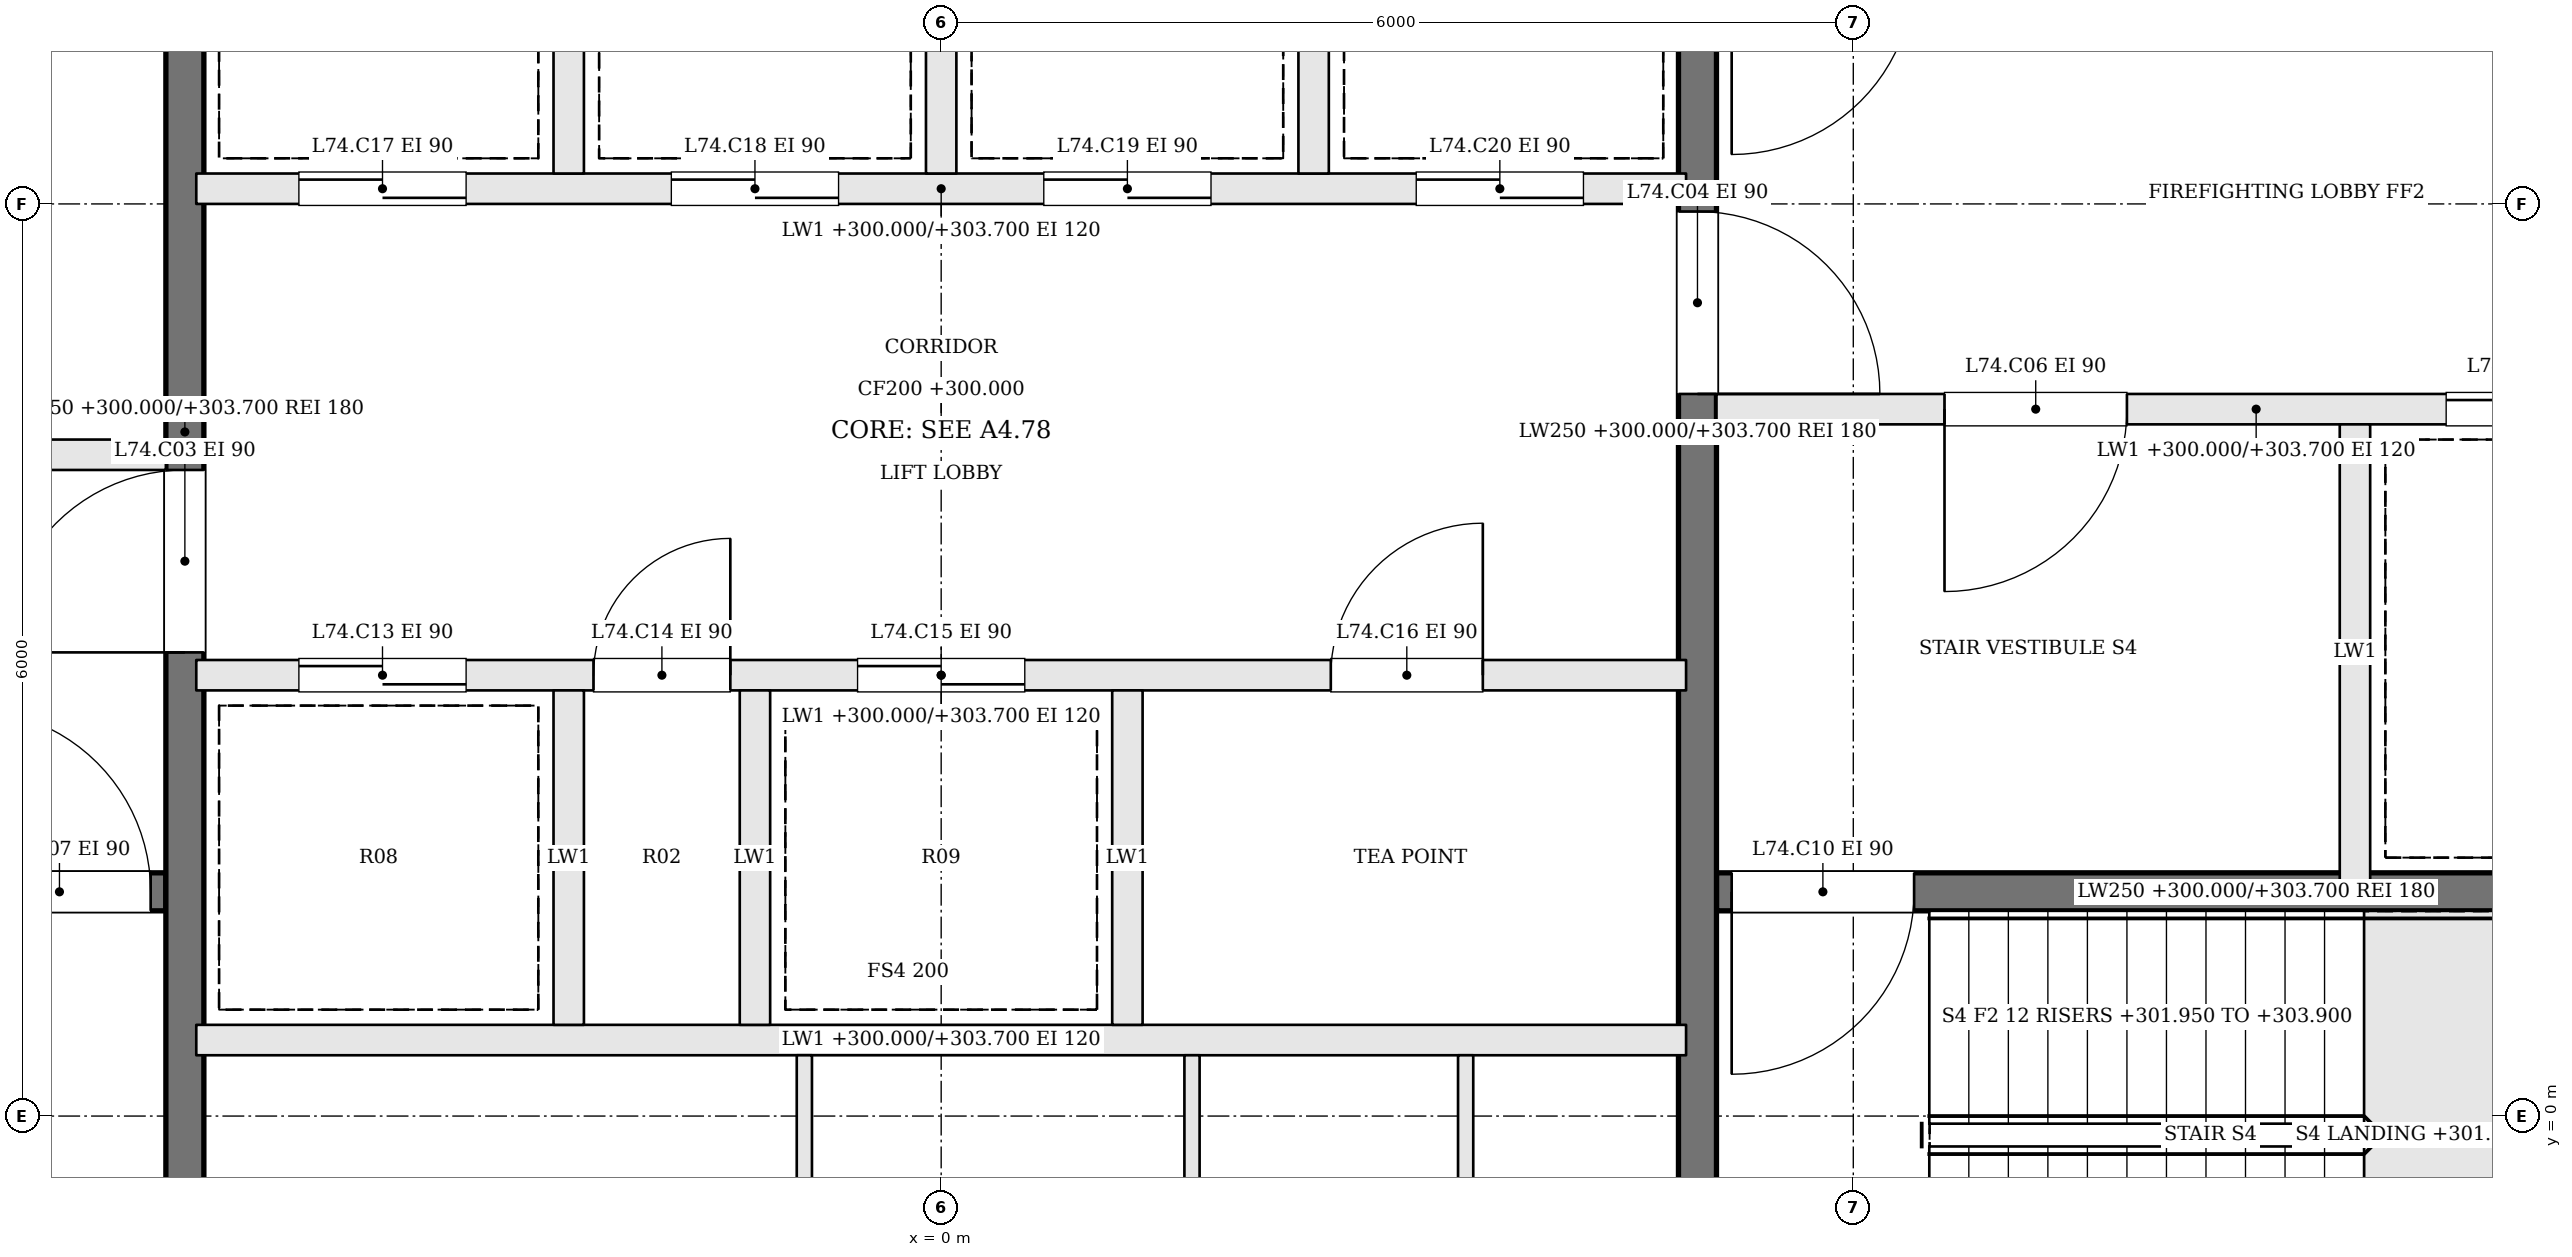
"""IFC4 building model, lengths in metres.
Left out: names, types, materials, properties, quantities, classifications, styles, units other than length and angle.
Written with IfcOpenShell. Run it as: python <this file> out.ifc"""

import sys

from ifc_helpers import new_model, si_unit, direction, frame, frame_2d, origin, place, context, subcontext, project, spatial, rectangle, extrude, element, fill, save


model = new_model("IFC4")
c1 = context("Model", 3, precision=1e-05, world=origin(), true_north=direction((0.0, 1.0)))
c2 = subcontext(c1, "Body", "Model", "MODEL_VIEW")
j1 = project(units=[si_unit("LENGTHUNIT", "METRE"), si_unit("PLANEANGLEUNIT", "RADIAN")], contexts=[c1])
p1 = place(None, origin())
s1 = spatial("IfcSite", under=j1, at=p1, CompositionType="ELEMENT")
p2 = place(p1, origin())
s2 = spatial("IfcBuilding", under=s1, at=p2, CompositionType="ELEMENT")
p3 = place(p2, frame((0.0, 0.0, 300.0)))
s3 = spatial("IfcBuildingStorey", under=s2, at=p3, CompositionType="ELEMENT", Elevation=300.0)
p4 = place(p3, frame((-12.2, 1.475, 0.0), z_axis=(0.0, 0.0, 1.0), x_axis=(1.0, 0.0, 0.0)))
e1 = element("IfcWall", 1, at=p4, inside=s3, PredefinedType="SOLIDWALL", context=c2, shape_type="SweptSolid", body=[
    extrude(rectangle(XDim=7.1, YDim=0.25, at=frame_2d((3.55, 0.0))), origin(), (0.0, 0.0, 1.0), 3.7),
])
p5 = place(p4, frame((5.8, 0.0, 0.0)))
e2 = element("IfcOpeningElement", 2, at=p5, cuts=e1, PredefinedType="OPENING", context=c2, shape_type="SweptSolid", body=[
    extrude(rectangle(XDim=1.2, YDim=2.1, at=frame_2d((0.6, 1.05))), frame((0.0, 0.135, 0.0), z_axis=(0.0, -1.0, 0.0), x_axis=(1.0, 0.0, 0.0)), (0.0, 0.0, 1.0), 0.27),
])
p6 = place(p3, frame((-12.2, 4.35, 0.0), z_axis=(0.0, 0.0, 1.0), x_axis=(1.0, 0.0, 0.0)))
e3 = element("IfcWall", 3, at=p6, inside=s3, PredefinedType="SOLIDWALL", context=c2, shape_type="SweptSolid", body=[
    extrude(rectangle(XDim=7.1, YDim=0.2, at=frame_2d((3.55, 0.0))), origin(), (0.0, 0.0, 1.0), 3.7),
])
p7 = place(p6, frame((4.4, 0.0, 0.0)))
e4 = element("IfcOpeningElement", 4, at=p7, cuts=e3, PredefinedType="OPENING", context=c2, shape_type="SweptSolid", body=[
    extrude(rectangle(XDim=1.2, YDim=2.1, at=frame_2d((0.6, 1.05))), frame((0.0, 0.11, 0.0), z_axis=(0.0, -1.0, 0.0), x_axis=(1.0, 0.0, 0.0)), (0.0, 0.0, 1.0), 0.22),
])
p8 = place(p6, frame((1.1, 0.0, 0.0)))
e5 = element("IfcOpeningElement", 5, at=p8, cuts=e3, PredefinedType="OPENING", context=c2, shape_type="SweptSolid", body=[
    extrude(rectangle(XDim=1.2, YDim=2.1, at=frame_2d((0.6, 1.05))), frame((0.0, 0.11, 0.0), z_axis=(0.0, -1.0, 0.0), x_axis=(1.0, 0.0, 0.0)), (0.0, 0.0, 1.0), 0.22),
])
p9 = place(p3, frame((12.2, 4.65, 0.0), z_axis=(0.0, 0.0, 1.0), x_axis=(-1.0, 0.0, 0.0)))
e6 = element("IfcWall", 6, at=p9, inside=s3, PredefinedType="SOLIDWALL", context=c2, shape_type="SweptSolid", body=[
    extrude(rectangle(XDim=7.1, YDim=0.2, at=frame_2d((3.55, 0.0))), origin(), (0.0, 0.0, 1.0), 3.7),
])
p10 = place(p9, frame((4.4, 0.0, 0.0)))
e7 = element("IfcOpeningElement", 7, at=p10, cuts=e6, PredefinedType="OPENING", context=c2, shape_type="SweptSolid", body=[
    extrude(rectangle(XDim=1.2, YDim=2.1, at=frame_2d((0.6, 1.05))), frame((0.0, 0.11, 0.0), z_axis=(0.0, -1.0, 0.0), x_axis=(1.0, 0.0, 0.0)), (0.0, 0.0, 1.0), 0.22),
])
p11 = place(p9, frame((1.1, 0.0, 0.0)))
e8 = element("IfcOpeningElement", 8, at=p11, cuts=e6, PredefinedType="OPENING", context=c2, shape_type="SweptSolid", body=[
    extrude(rectangle(XDim=1.2, YDim=2.1, at=frame_2d((0.6, 1.05))), frame((0.0, 0.11, 0.0), z_axis=(0.0, -1.0, 0.0), x_axis=(1.0, 0.0, 0.0)), (0.0, 0.0, 1.0), 0.22),
])
p12 = place(p3, frame((12.2, 1.475, 0.0), z_axis=(0.0, 0.0, 1.0), x_axis=(-1.0, 0.0, 0.0)))
e9 = element("IfcWall", 9, at=p12, inside=s3, PredefinedType="SOLIDWALL", context=c2, shape_type="SweptSolid", body=[
    extrude(rectangle(XDim=7.1, YDim=0.25, at=frame_2d((3.55, 0.0))), origin(), (0.0, 0.0, 1.0), 3.7),
])
p13 = place(p12, frame((5.8, 0.0, 0.0)))
e10 = element("IfcOpeningElement", 10, at=p13, cuts=e9, PredefinedType="OPENING", context=c2, shape_type="SweptSolid", body=[
    extrude(rectangle(XDim=1.2, YDim=2.1, at=frame_2d((0.6, 1.05))), frame((0.0, 0.135, 0.0), z_axis=(0.0, -1.0, 0.0), x_axis=(1.0, 0.0, 0.0)), (0.0, 0.0, 1.0), 0.27),
])
p14 = place(p3, frame((9.3, 4.55, 0.0), z_axis=(0.0, 0.0, 1.0), x_axis=(0.0, -1.0, 0.0)))
e11 = element("IfcWall", 11, at=p14, inside=s3, PredefinedType="SOLIDWALL", context=c2, shape_type="SweptSolid", body=[
    extrude(rectangle(XDim=3.0, YDim=0.2, at=frame_2d((1.5, 0.0))), origin(), (0.0, 0.0, 1.0), 3.7),
])
p15 = place(p3, frame((-4.975, -2.2, 0.0), z_axis=(0.0, 0.0, 1.0), x_axis=(0.0, 1.0, 0.0)))
e12 = element("IfcWall", 12, at=p15, inside=s3, PredefinedType="SOLIDWALL", context=c2, shape_type="SweptSolid", body=[
    extrude(rectangle(XDim=13.4, YDim=0.25, at=frame_2d((6.7, 0.0))), origin(), (0.0, 0.0, 1.0), 3.7),
])
p16 = place(p15, frame((5.25, 0.0, 0.0)))
e13 = element("IfcOpeningElement", 13, at=p16, cuts=e12, PredefinedType="OPENING", context=c2, shape_type="SweptSolid", body=[
    extrude(rectangle(XDim=1.2, YDim=2.1, at=frame_2d((0.6, 1.05))), frame((0.0, 0.135, 0.0), z_axis=(0.0, -1.0, 0.0), x_axis=(1.0, 0.0, 0.0)), (0.0, 0.0, 1.0), 0.27),
])
p17 = place(p3, frame((4.975, 11.2, 0.0), z_axis=(0.0, 0.0, 1.0), x_axis=(0.0, -1.0, 0.0)))
e14 = element("IfcWall", 14, at=p17, inside=s3, PredefinedType="SOLIDWALL", context=c2, shape_type="SweptSolid", body=[
    extrude(rectangle(XDim=13.4, YDim=0.25, at=frame_2d((6.7, 0.0))), origin(), (0.0, 0.0, 1.0), 3.7),
])
p18 = place(p17, frame((5.25, 0.0, 0.0)))
e15 = element("IfcOpeningElement", 15, at=p18, cuts=e14, PredefinedType="OPENING", context=c2, shape_type="SweptSolid", body=[
    extrude(rectangle(XDim=1.2, YDim=2.1, at=frame_2d((0.6, 1.05))), frame((0.0, 0.135, 0.0), z_axis=(0.0, -1.0, 0.0), x_axis=(1.0, 0.0, 0.0)), (0.0, 0.0, 1.0), 0.27),
])
p19 = place(p3, frame((-4.9, 0.5, 0.0), z_axis=(0.0, 0.0, 1.0), x_axis=(1.0, 0.0, 0.0)))
e16 = element("IfcWall", 16, at=p19, inside=s3, PredefinedType="SOLIDWALL", context=c2, shape_type="SweptSolid", body=[
    extrude(rectangle(XDim=9.8, YDim=0.2, at=frame_2d((4.9, 0.0))), origin(), (0.0, 0.0, 1.0), 3.7),
])
p20 = place(p3, frame((-4.9, 2.9, 0.0), z_axis=(0.0, 0.0, 1.0), x_axis=(1.0, 0.0, 0.0)))
e17 = element("IfcWall", 17, at=p20, inside=s3, PredefinedType="SOLIDWALL", context=c2, shape_type="SweptSolid", body=[
    extrude(rectangle(XDim=9.8, YDim=0.2, at=frame_2d((4.9, 0.0))), origin(), (0.0, 0.0, 1.0), 3.7),
])
p21 = place(p20, frame((0.675, 0.0, 0.0)))
e18 = element("IfcOpeningElement", 18, at=p21, cuts=e17, PredefinedType="OPENING", context=c2, shape_type="SweptSolid", body=[
    extrude(rectangle(XDim=1.1, YDim=2.1, at=frame_2d((0.55, 1.05))), frame((0.0, 0.11, 0.0), z_axis=(0.0, -1.0, 0.0), x_axis=(1.0, 0.0, 0.0)), (0.0, 0.0, 1.0), 0.22),
])
p22 = place(p20, frame((2.613, 0.0, 0.0)))
e19 = element("IfcOpeningElement", 19, at=p22, cuts=e17, PredefinedType="OPENING", context=c2, shape_type="SweptSolid", body=[
    extrude(rectangle(XDim=0.9, YDim=2.1, at=frame_2d((0.45, 1.05))), frame((0.0, 0.11, 0.0), z_axis=(0.0, -1.0, 0.0), x_axis=(1.0, 0.0, 0.0)), (0.0, 0.0, 1.0), 0.22),
])
p23 = place(p20, frame((4.35, 0.0, 0.0)))
e20 = element("IfcOpeningElement", 20, at=p23, cuts=e17, PredefinedType="OPENING", context=c2, shape_type="SweptSolid", body=[
    extrude(rectangle(XDim=1.1, YDim=2.1, at=frame_2d((0.55, 1.05))), frame((0.0, 0.11, 0.0), z_axis=(0.0, -1.0, 0.0), x_axis=(1.0, 0.0, 0.0)), (0.0, 0.0, 1.0), 0.22),
])
p24 = place(p20, frame((7.463, 0.0, 0.0)))
e21 = element("IfcOpeningElement", 21, at=p24, cuts=e17, PredefinedType="OPENING", context=c2, shape_type="SweptSolid", body=[
    extrude(rectangle(XDim=1.0, YDim=2.1, at=frame_2d((0.5, 1.05))), frame((0.0, 0.11, 0.0), z_axis=(0.0, -1.0, 0.0), x_axis=(1.0, 0.0, 0.0)), (0.0, 0.0, 1.0), 0.22),
])
p25 = place(p3, frame((-4.9, 6.1, 0.0), z_axis=(0.0, 0.0, 1.0), x_axis=(1.0, 0.0, 0.0)))
e22 = element("IfcWall", 22, at=p25, inside=s3, PredefinedType="SOLIDWALL", context=c2, shape_type="SweptSolid", body=[
    extrude(rectangle(XDim=9.8, YDim=0.2, at=frame_2d((4.9, 0.0))), origin(), (0.0, 0.0, 1.0), 3.7),
])
p26 = place(p25, frame((0.675, 0.0, 0.0)))
e23 = element("IfcOpeningElement", 23, at=p26, cuts=e22, PredefinedType="OPENING", context=c2, shape_type="SweptSolid", body=[
    extrude(rectangle(XDim=1.1, YDim=2.1, at=frame_2d((0.55, 1.05))), frame((0.0, 0.11, 0.0), z_axis=(0.0, -1.0, 0.0), x_axis=(1.0, 0.0, 0.0)), (0.0, 0.0, 1.0), 0.22),
])
p27 = place(p25, frame((3.125, 0.0, 0.0)))
e24 = element("IfcOpeningElement", 24, at=p27, cuts=e22, PredefinedType="OPENING", context=c2, shape_type="SweptSolid", body=[
    extrude(rectangle(XDim=1.1, YDim=2.1, at=frame_2d((0.55, 1.05))), frame((0.0, 0.11, 0.0), z_axis=(0.0, -1.0, 0.0), x_axis=(1.0, 0.0, 0.0)), (0.0, 0.0, 1.0), 0.22),
])
p28 = place(p25, frame((5.575, 0.0, 0.0)))
e25 = element("IfcOpeningElement", 25, at=p28, cuts=e22, PredefinedType="OPENING", context=c2, shape_type="SweptSolid", body=[
    extrude(rectangle(XDim=1.1, YDim=2.1, at=frame_2d((0.55, 1.05))), frame((0.0, 0.11, 0.0), z_axis=(0.0, -1.0, 0.0), x_axis=(1.0, 0.0, 0.0)), (0.0, 0.0, 1.0), 0.22),
])
p29 = place(p25, frame((8.025, 0.0, 0.0)))
e26 = element("IfcOpeningElement", 26, at=p29, cuts=e22, PredefinedType="OPENING", context=c2, shape_type="SweptSolid", body=[
    extrude(rectangle(XDim=1.1, YDim=2.1, at=frame_2d((0.55, 1.05))), frame((0.0, 0.11, 0.0), z_axis=(0.0, -1.0, 0.0), x_axis=(1.0, 0.0, 0.0)), (0.0, 0.0, 1.0), 0.22),
])
for number, where, z_axis, x_axis in (
    (27, (-2.45, 0.6, 0.0), (0.0, 0.0, 1.0), (0.0, 1.0, 0.0)),
    (28, (-1.225, 0.6, 0.0), (0.0, 0.0, 1.0), (0.0, 1.0, 0.0)),
    (29, (1.225, 0.6, 0.0), (0.0, 0.0, 1.0), (0.0, 1.0, 0.0)),
    (30, (-2.45, 6.2, 0.0), (0.0, 0.0, 1.0), (0.0, 1.0, 0.0)),
    (31, (0.0, 6.2, 0.0), (0.0, 0.0, 1.0), (0.0, 1.0, 0.0)),
    (32, (2.45, 6.2, 0.0), (0.0, 0.0, 1.0), (0.0, 1.0, 0.0)),
):
    element("IfcWall", number, at=place(p3, frame(where, z_axis=z_axis, x_axis=x_axis)), inside=s3, PredefinedType="SOLIDWALL", context=c2, shape_type="SweptSolid", body=[
        extrude(rectangle(XDim=2.2, YDim=0.2, at=frame_2d((1.1, 0.0))), origin(), (0.0, 0.0, 1.0), 3.7),
    ])
for number, where, z_axis, x_axis in (
    (33, (-0.9, -2.2, 0.0), (0.0, 0.0, 1.0), (0.0, 1.0, 0.0)),
    (34, (1.65, -2.2, 0.0), (0.0, 0.0, 1.0), (0.0, 1.0, 0.0)),
    (35, (3.45, -2.2, 0.0), (0.0, 0.0, 1.0), (0.0, 1.0, 0.0)),
):
    element("IfcWall", number, at=place(p3, frame(where, z_axis=z_axis, x_axis=x_axis)), inside=s3, PredefinedType="PARTITIONING", context=c2, shape_type="SweptSolid", body=[
        extrude(rectangle(XDim=2.6, YDim=0.1, at=frame_2d((1.3, 0.0))), origin(), (0.0, 0.0, 1.0), 3.7),
    ])
p30 = place(p16, origin())
e36 = element("IfcDoor", 36, at=p30, inside=s3, OperationType="SINGLE_SWING_LEFT", PredefinedType="DOOR", context=c2, shape_type="SweptSolid", body=[
    extrude(rectangle(XDim=1.2, YDim=2.1, at=frame_2d((0.6, 1.05))), frame((0.0, 0.025, 0.0), z_axis=(0.0, -1.0, 0.0), x_axis=(1.0, 0.0, 0.0)), (0.0, 0.0, 1.0), 0.05),
])
fill(e13, e36)
p31 = place(p18, origin())
e37 = element("IfcDoor", 37, at=p31, inside=s3, OperationType="SINGLE_SWING_RIGHT", PredefinedType="DOOR", context=c2, shape_type="SweptSolid", body=[
    extrude(rectangle(XDim=1.2, YDim=2.1, at=frame_2d((0.6, 1.05))), frame((0.0, 0.025, 0.0), z_axis=(0.0, -1.0, 0.0), x_axis=(1.0, 0.0, 0.0)), (0.0, 0.0, 1.0), 0.05),
])
fill(e15, e37)
p32 = place(p10, origin())
e38 = element("IfcDoor", 38, at=p32, inside=s3, OperationType="SINGLE_SWING_RIGHT", PredefinedType="DOOR", context=c2, shape_type="SweptSolid", body=[
    extrude(rectangle(XDim=1.2, YDim=2.1, at=frame_2d((0.6, 1.05))), frame((0.0, 0.025, 0.0), z_axis=(0.0, -1.0, 0.0), x_axis=(1.0, 0.0, 0.0)), (0.0, 0.0, 1.0), 0.05),
])
fill(e7, e38)
p33 = place(p5, origin())
e39 = element("IfcDoor", 39, at=p33, inside=s3, OperationType="SINGLE_SWING_LEFT", PredefinedType="DOOR", context=c2, shape_type="SweptSolid", body=[
    extrude(rectangle(XDim=1.2, YDim=2.1, at=frame_2d((0.6, 1.05))), frame((0.0, 0.025, 0.0), z_axis=(0.0, -1.0, 0.0), x_axis=(1.0, 0.0, 0.0)), (0.0, 0.0, 1.0), 0.05),
])
fill(e2, e39)
p34 = place(p13, origin())
e40 = element("IfcDoor", 40, at=p34, inside=s3, OperationType="SINGLE_SWING_RIGHT", PredefinedType="DOOR", context=c2, shape_type="SweptSolid", body=[
    extrude(rectangle(XDim=1.2, YDim=2.1, at=frame_2d((0.6, 1.05))), frame((0.0, 0.025, 0.0), z_axis=(0.0, -1.0, 0.0), x_axis=(1.0, 0.0, 0.0)), (0.0, 0.0, 1.0), 0.05),
])
fill(e10, e40)
p35 = place(p11, origin())
e41 = element("IfcDoor", 41, at=p35, inside=s3, OperationType="SLIDING_TO_RIGHT", PredefinedType="DOOR", context=c2, shape_type="SweptSolid", body=[
    extrude(rectangle(XDim=1.2, YDim=2.1, at=frame_2d((0.6, 1.05))), frame((0.0, 0.025, 0.0), z_axis=(0.0, -1.0, 0.0), x_axis=(1.0, 0.0, 0.0)), (0.0, 0.0, 1.0), 0.05),
])
fill(e8, e41)
p36 = place(p21, origin())
e42 = element("IfcDoor", 42, at=p36, inside=s3, OperationType="SLIDING_TO_RIGHT", PredefinedType="DOOR", context=c2, shape_type="SweptSolid", body=[
    extrude(rectangle(XDim=1.1, YDim=2.1, at=frame_2d((0.55, 1.05))), frame((0.0, 0.025, 0.0), z_axis=(0.0, -1.0, 0.0), x_axis=(1.0, 0.0, 0.0)), (0.0, 0.0, 1.0), 0.05),
])
fill(e18, e42)
p37 = place(p22, origin())
e43 = element("IfcDoor", 43, at=p37, inside=s3, OperationType="SINGLE_SWING_RIGHT", PredefinedType="DOOR", context=c2, shape_type="SweptSolid", body=[
    extrude(rectangle(XDim=0.9, YDim=2.1, at=frame_2d((0.45, 1.05))), frame((0.0, 0.025, 0.0), z_axis=(0.0, -1.0, 0.0), x_axis=(1.0, 0.0, 0.0)), (0.0, 0.0, 1.0), 0.05),
])
fill(e19, e43)
p38 = place(p23, origin())
e44 = element("IfcDoor", 44, at=p38, inside=s3, OperationType="SLIDING_TO_LEFT", PredefinedType="DOOR", context=c2, shape_type="SweptSolid", body=[
    extrude(rectangle(XDim=1.1, YDim=2.1, at=frame_2d((0.55, 1.05))), frame((0.0, 0.025, 0.0), z_axis=(0.0, -1.0, 0.0), x_axis=(1.0, 0.0, 0.0)), (0.0, 0.0, 1.0), 0.05),
])
fill(e20, e44)
p39 = place(p24, origin())
e45 = element("IfcDoor", 45, at=p39, inside=s3, OperationType="SINGLE_SWING_RIGHT", PredefinedType="DOOR", context=c2, shape_type="SweptSolid", body=[
    extrude(rectangle(XDim=1.0, YDim=2.1, at=frame_2d((0.5, 1.05))), frame((0.0, 0.025, 0.0), z_axis=(0.0, -1.0, 0.0), x_axis=(1.0, 0.0, 0.0)), (0.0, 0.0, 1.0), 0.05),
])
fill(e21, e45)
p40 = place(p26, origin())
e46 = element("IfcDoor", 46, at=p40, inside=s3, OperationType="SLIDING_TO_RIGHT", PredefinedType="DOOR", context=c2, shape_type="SweptSolid", body=[
    extrude(rectangle(XDim=1.1, YDim=2.1, at=frame_2d((0.55, 1.05))), frame((0.0, 0.025, 0.0), z_axis=(0.0, -1.0, 0.0), x_axis=(1.0, 0.0, 0.0)), (0.0, 0.0, 1.0), 0.05),
])
fill(e23, e46)
p41 = place(p27, origin())
e47 = element("IfcDoor", 47, at=p41, inside=s3, OperationType="SLIDING_TO_LEFT", PredefinedType="DOOR", context=c2, shape_type="SweptSolid", body=[
    extrude(rectangle(XDim=1.1, YDim=2.1, at=frame_2d((0.55, 1.05))), frame((0.0, 0.025, 0.0), z_axis=(0.0, -1.0, 0.0), x_axis=(1.0, 0.0, 0.0)), (0.0, 0.0, 1.0), 0.05),
])
fill(e24, e47)
p42 = place(p28, origin())
e48 = element("IfcDoor", 48, at=p42, inside=s3, OperationType="SLIDING_TO_RIGHT", PredefinedType="DOOR", context=c2, shape_type="SweptSolid", body=[
    extrude(rectangle(XDim=1.1, YDim=2.1, at=frame_2d((0.55, 1.05))), frame((0.0, 0.025, 0.0), z_axis=(0.0, -1.0, 0.0), x_axis=(1.0, 0.0, 0.0)), (0.0, 0.0, 1.0), 0.05),
])
fill(e25, e48)
p43 = place(p29, origin())
e49 = element("IfcDoor", 49, at=p43, inside=s3, OperationType="SLIDING_TO_LEFT", PredefinedType="DOOR", context=c2, shape_type="SweptSolid", body=[
    extrude(rectangle(XDim=1.1, YDim=2.1, at=frame_2d((0.55, 1.05))), frame((0.0, 0.025, 0.0), z_axis=(0.0, -1.0, 0.0), x_axis=(1.0, 0.0, 0.0)), (0.0, 0.0, 1.0), 0.05),
])
fill(e26, e49)
save(model, sys.argv[1])
